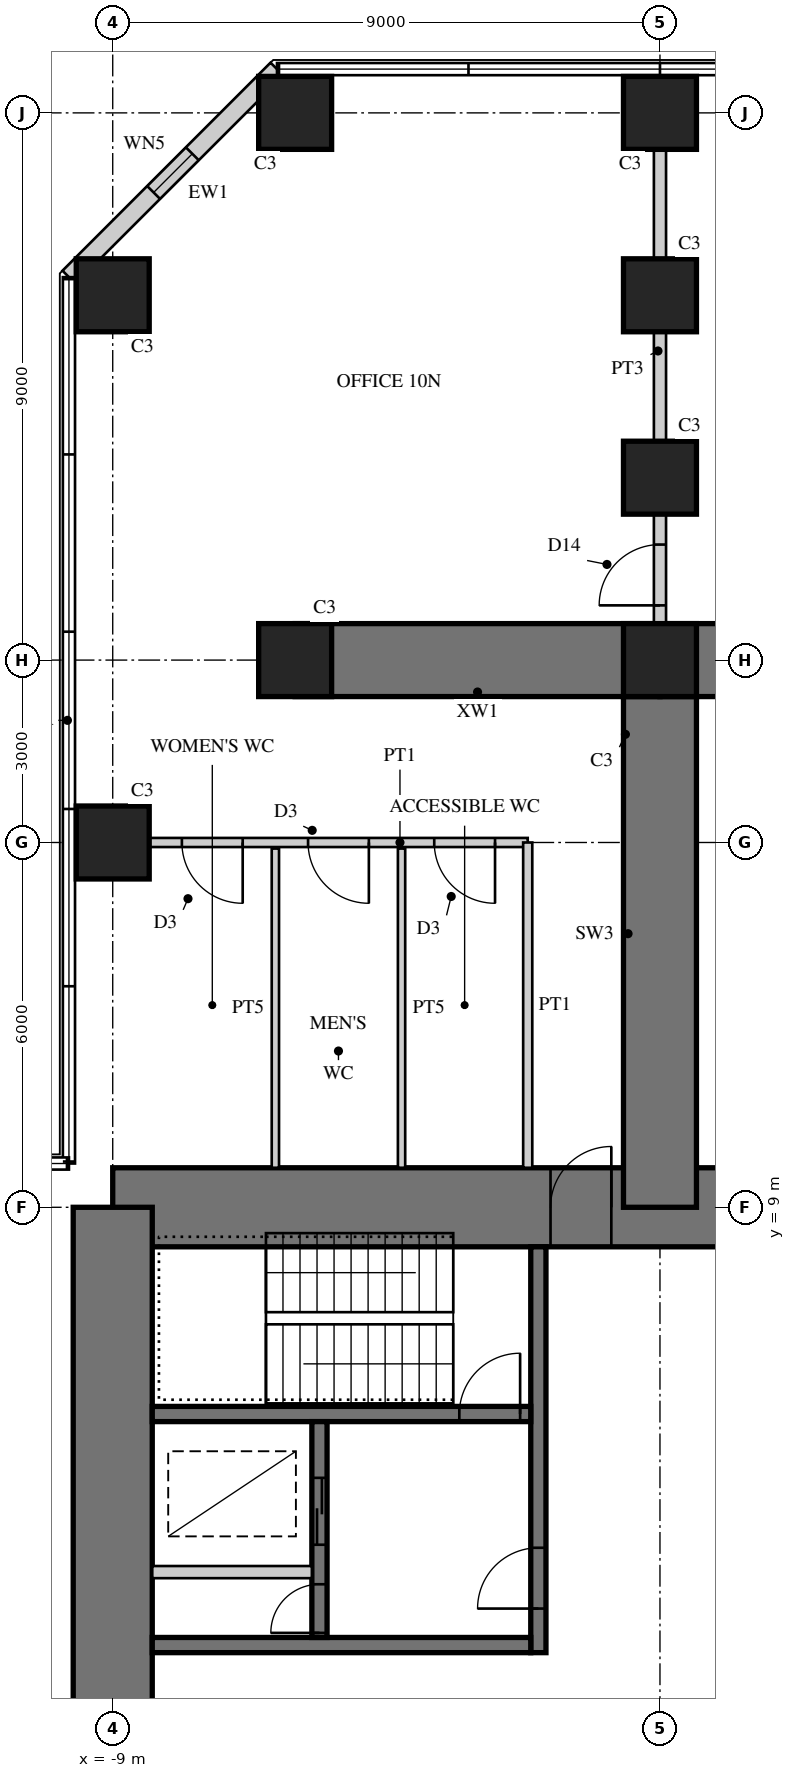
"""IFC4 building model, lengths in metres.
Left out: names, types, materials, properties, quantities, classifications, styles, units other than length and angle.
Written with IfcOpenShell. Run it as: python <this file> out.ifc"""

import sys

from ifc_helpers import new_model, si_unit, direction, frame, frame_2d, origin, origin_2d, place, context, subcontext, project, spatial, rectangle, hollow_rectangle, extrude, element, fill, save


model = new_model("IFC4")
c1 = context("Model", 3, precision=1e-05, world=origin(), true_north=direction((0.0, 1.0)))
c2 = subcontext(c1, "Body", "Model", "MODEL_VIEW")
j1 = project(units=[si_unit("LENGTHUNIT", "METRE"), si_unit("PLANEANGLEUNIT", "RADIAN")], contexts=[c1])
p1 = place(None, origin())
s1 = spatial("IfcSite", under=j1, at=p1, CompositionType="ELEMENT")
p2 = place(p1, origin())
s2 = spatial("IfcBuilding", under=s1, at=p2, CompositionType="ELEMENT")
p3 = place(p2, frame((0.0, 0.0, 43.5)))
s3 = spatial("IfcBuildingStorey", under=s2, at=p3, CompositionType="ELEMENT", Elevation=43.5)
p4 = place(p3, frame((9.0, 9.0, 0.0), z_axis=(0.0, 0.0, 1.0), x_axis=(-1.0, 0.0, 0.0)))
e1 = element("IfcWall", 1, at=p4, inside=s3, PredefinedType="SHEAR", context=c2, shape_type="SweptSolid", body=[
    extrude(rectangle(XDim=18.0, YDim=1.3, at=frame_2d((9.0, 0.0))), origin(), (0.0, 0.0, 1.0), 4.0),
])
p5 = place(p4, frame((9.8, 0.0, 0.0)))
e2 = element("IfcOpeningElement", 2, at=p5, cuts=e1, PredefinedType="OPENING", context=c2, shape_type="SweptSolid", body=[
    extrude(rectangle(XDim=1.0, YDim=2.4, at=frame_2d((0.5, 1.2))), frame((0.0, 0.66, 0.0), z_axis=(0.0, -1.0, 0.0), x_axis=(1.0, 0.0, 0.0)), (0.0, 0.0, 1.0), 1.32),
])
p6 = place(p3, frame((-9.0, 9.0, 0.0), z_axis=(0.0, 0.0, 1.0), x_axis=(0.0, -1.0, 0.0)))
e3 = element("IfcWall", 3, at=p6, inside=s3, PredefinedType="SHEAR", context=c2, shape_type="SweptSolid", body=[
    extrude(rectangle(XDim=18.0, YDim=1.3, at=frame_2d((9.0, 0.0))), origin(), (0.0, 0.0, 1.0), 4.0),
])
p7 = place(p6, frame((9.8, 0.0, 0.0)))
e4 = element("IfcOpeningElement", 4, at=p7, cuts=e3, PredefinedType="OPENING", context=c2, shape_type="SweptSolid", body=[
    extrude(rectangle(XDim=1.0, YDim=2.4, at=frame_2d((0.5, 1.2))), frame((0.0, 0.66, 0.0), z_axis=(0.0, -1.0, 0.0), x_axis=(1.0, 0.0, 0.0)), (0.0, 0.0, 1.0), 1.32),
])
p8 = place(p3, frame((-2.0, 1.675, 0.0), z_axis=(0.0, 0.0, 1.0), x_axis=(0.0, 1.0, 0.0)))
e5 = element("IfcWall", 5, at=p8, inside=s3, PredefinedType="SHEAR", context=c2, shape_type="SweptSolid", body=[
    extrude(rectangle(XDim=6.675, YDim=0.25, at=frame_2d((3.337, 0.0))), origin(), (0.0, 0.0, 1.0), 4.0),
])
p9 = place(p8, frame((0.725, 0.0, 0.0)))
e6 = element("IfcOpeningElement", 6, at=p9, cuts=e5, PredefinedType="OPENING", context=c2, shape_type="SweptSolid", body=[
    extrude(rectangle(XDim=1.0, YDim=2.1, at=frame_2d((0.5, 1.05))), frame((0.0, 0.135, 0.0), z_axis=(0.0, -1.0, 0.0), x_axis=(1.0, 0.0, 0.0)), (0.0, 0.0, 1.0), 0.27),
])
p10 = place(p3, frame((-2.125, 1.8, 0.0), z_axis=(0.0, 0.0, 1.0), x_axis=(-1.0, 0.0, 0.0)))
e7 = element("IfcWall", 7, at=p10, inside=s3, PredefinedType="SHEAR", context=c2, shape_type="SweptSolid", body=[
    extrude(rectangle(XDim=6.225, YDim=0.25, at=frame_2d((3.113, 0.0))), origin(), (0.0, 0.0, 1.0), 4.0),
])
p11 = place(p3, frame((-2.125, 5.6, 0.0), z_axis=(0.0, 0.0, 1.0), x_axis=(-1.0, 0.0, 0.0)))
e8 = element("IfcWall", 8, at=p11, inside=s3, PredefinedType="SHEAR", context=c2, shape_type="SweptSolid", body=[
    extrude(rectangle(XDim=6.225, YDim=0.25, at=frame_2d((3.113, 0.0))), origin(), (0.0, 0.0, 1.0), 4.0),
])
p12 = place(p11, frame((0.175, 0.0, 0.0)))
e9 = element("IfcOpeningElement", 9, at=p12, cuts=e8, PredefinedType="OPENING", context=c2, shape_type="SweptSolid", body=[
    extrude(rectangle(XDim=1.0, YDim=2.1, at=frame_2d((0.5, 1.05))), frame((0.0, 0.135, 0.0), z_axis=(0.0, -1.0, 0.0), x_axis=(1.0, 0.0, 0.0)), (0.0, 0.0, 1.0), 0.27),
])
p13 = place(p3, frame((-5.6, 1.925, 0.0), z_axis=(0.0, 0.0, 1.0), x_axis=(0.0, 1.0, 0.0)))
e10 = element("IfcWall", 10, at=p13, inside=s3, PredefinedType="SHEAR", context=c2, shape_type="SweptSolid", body=[
    extrude(rectangle(XDim=3.55, YDim=0.25, at=frame_2d((1.775, 0.0))), origin(), (0.0, 0.0, 1.0), 4.0),
])
p14 = place(p13, frame((1.525, 0.0, 0.0)))
e11 = element("IfcOpeningElement", 11, at=p14, cuts=e10, PredefinedType="OPENING", context=c2, shape_type="SweptSolid", body=[
    extrude(rectangle(XDim=1.1, YDim=2.2, at=frame_2d((0.55, 1.1))), frame((0.0, 0.135, 0.0), z_axis=(0.0, -1.0, 0.0), x_axis=(1.0, 0.0, 0.0)), (0.0, 0.0, 1.0), 0.27),
])
p15 = place(p13, frame((0.075, 0.0, 0.0)))
e12 = element("IfcOpeningElement", 12, at=p15, cuts=e10, PredefinedType="OPENING", context=c2, shape_type="SweptSolid", body=[
    extrude(rectangle(XDim=0.8, YDim=2.1, at=frame_2d((0.4, 1.05))), frame((0.0, 0.135, 0.0), z_axis=(0.0, -1.0, 0.0), x_axis=(1.0, 0.0, 0.0)), (0.0, 0.0, 1.0), 0.27),
])
p16 = place(p3, frame((-5.725, 3.0, 0.0), z_axis=(0.0, 0.0, 1.0), x_axis=(-1.0, 0.0, 0.0)))
e13 = element("IfcWall", 13, at=p16, inside=s3, PredefinedType="PARTITIONING", context=c2, shape_type="SweptSolid", body=[
    extrude(rectangle(XDim=2.625, YDim=0.2, at=frame_2d((1.312, 0.0))), origin(), (0.0, 0.0, 1.0), 4.0),
])
p17 = place(p3, frame((0.0, 9.0, 0.0), z_axis=(0.0, 0.0, 1.0), x_axis=(0.0, 1.0, 0.0)))
e14 = element("IfcWall", 14, at=p17, inside=s3, PredefinedType="SHEAR", context=c2, shape_type="SweptSolid", body=[
    extrude(rectangle(XDim=9.0, YDim=1.2, at=frame_2d((4.5, 0.0))), origin(), (0.0, 0.0, 1.0), 4.0),
])
for number, where, z_axis, x_axis in (
    (15, (0.0, 18.0, 0.0), (0.0, 0.0, 1.0), (-1.0, 0.0, 0.0)),
    (16, (0.0, 18.0, 0.0), (0.0, 0.0, 1.0), (1.0, 0.0, 0.0)),
):
    element("IfcWall", number, at=place(p3, frame(where, z_axis=z_axis, x_axis=x_axis)), inside=s3, PredefinedType="SHEAR", context=c2, shape_type="SweptSolid", body=[
        extrude(rectangle(XDim=6.0, YDim=1.2, at=frame_2d((3.0, 0.0))), origin(), (0.0, 0.0, 1.0), 4.0),
    ])
for number, where, z_axis, x_axis in (
    (17, (-9.0, 15.0, 0.0), (0.0, 0.0, 1.0), (1.0, 0.0, 0.0)),
    (18, (-9.0, 24.0, 0.0), (0.0, 0.0, 1.0), (1.0, 0.0, 0.0)),
    (19, (0.0, 27.0, 0.0), (0.0, 0.0, 1.0), (1.0, 0.0, 0.0)),
    (20, (-6.0, 27.0, 0.0), (0.0, 0.0, 1.0), (1.0, 0.0, 0.0)),
    (21, (0.0, 18.0, 0.0), (0.0, 0.0, 1.0), (1.0, 0.0, 0.0)),
    (22, (-6.0, 18.0, 0.0), (0.0, 0.0, 1.0), (1.0, 0.0, 0.0)),
    (23, (0.0, 21.0, 0.0), (0.0, 0.0, 1.0), (1.0, 0.0, 0.0)),
    (24, (0.0, 24.0, 0.0), (0.0, 0.0, 1.0), (1.0, 0.0, 0.0)),
):
    element("IfcColumn", number, at=place(p3, frame(where, z_axis=z_axis, x_axis=x_axis)), inside=s3, PredefinedType="COLUMN", context=c2, shape_type="SweptSolid", body=[
        extrude(rectangle(XDim=1.2, YDim=1.2, at=origin_2d()), origin(), (0.0, 0.0, 1.0), 4.0),
    ])
p18 = place(p3, frame((-6.298, 27.72, 0.0), z_axis=(0.0, 0.0, 1.0), x_axis=(-0.707106781187, -0.707106781187, 0.0)))
e25 = element("IfcWall", 25, at=p18, inside=s3, PredefinedType="SOLIDWALL", context=c2, shape_type="SweptSolid", body=[
    extrude(rectangle(XDim=4.839, YDim=0.3, at=frame_2d((2.419, 0.0))), origin(), (0.0, 0.0, 1.0), 3.8),
])
p19 = place(p18, frame((1.969, 0.0, 0.3)))
e26 = element("IfcOpeningElement", 26, at=p19, cuts=e25, PredefinedType="OPENING", context=c2, shape_type="SweptSolid", body=[
    extrude(rectangle(XDim=0.9, YDim=2.4, at=frame_2d((0.45, 1.2))), frame((0.0, 0.16, 0.0), z_axis=(0.0, -1.0, 0.0), x_axis=(1.0, 0.0, 0.0)), (0.0, 0.0, 1.0), 0.32),
])
p20 = place(p3, frame((-2.175, 15.0, 0.0), z_axis=(0.0, 0.0, 1.0), x_axis=(-1.0, 0.0, 0.0)))
e27 = element("IfcWall", 27, at=p20, inside=s3, PredefinedType="PARTITIONING", context=c2, shape_type="SweptSolid", body=[
    extrude(rectangle(XDim=6.225, YDim=0.15, at=frame_2d((3.112, 0.0))), origin(), (0.0, 0.0, 1.0), 2.95),
])
p21 = place(p20, frame((0.538, 0.0, 0.0)))
e28 = element("IfcOpeningElement", 28, at=p21, cuts=e27, PredefinedType="OPENING", context=c2, shape_type="SweptSolid", body=[
    extrude(rectangle(XDim=1.0, YDim=2.1, at=frame_2d((0.5, 1.05))), frame((0.0, 0.085, 0.0), z_axis=(0.0, -1.0, 0.0), x_axis=(1.0, 0.0, 0.0)), (0.0, 0.0, 1.0), 0.17),
])
p22 = place(p20, frame((2.613, 0.0, 0.0)))
e29 = element("IfcOpeningElement", 29, at=p22, cuts=e27, PredefinedType="OPENING", context=c2, shape_type="SweptSolid", body=[
    extrude(rectangle(XDim=1.0, YDim=2.1, at=frame_2d((0.5, 1.05))), frame((0.0, 0.085, 0.0), z_axis=(0.0, -1.0, 0.0), x_axis=(1.0, 0.0, 0.0)), (0.0, 0.0, 1.0), 0.17),
])
p23 = place(p20, frame((4.688, 0.0, 0.0)))
e30 = element("IfcOpeningElement", 30, at=p23, cuts=e27, PredefinedType="OPENING", context=c2, shape_type="SweptSolid", body=[
    extrude(rectangle(XDim=1.0, YDim=2.1, at=frame_2d((0.5, 1.05))), frame((0.0, 0.085, 0.0), z_axis=(0.0, -1.0, 0.0), x_axis=(1.0, 0.0, 0.0)), (0.0, 0.0, 1.0), 0.17),
])
p24 = place(p3, frame((-2.175, 9.65, 0.0), z_axis=(0.0, 0.0, 1.0), x_axis=(0.0, 1.0, 0.0)))
e31 = element("IfcWall", 31, at=p24, inside=s3, PredefinedType="PARTITIONING", context=c2, shape_type="SweptSolid", body=[
    extrude(rectangle(XDim=5.35, YDim=0.15, at=frame_2d((2.675, 0.0))), origin(), (0.0, 0.0, 1.0), 3.8),
])
for number, where, z_axis, x_axis in (
    (32, (-4.25, 9.65, 0.0), (0.0, 0.0, 1.0), (0.0, 1.0, 0.0)),
    (33, (-6.325, 9.65, 0.0), (0.0, 0.0, 1.0), (0.0, 1.0, 0.0)),
):
    element("IfcWall", number, at=place(p3, frame(where, z_axis=z_axis, x_axis=x_axis)), inside=s3, PredefinedType="PLUMBINGWALL", context=c2, shape_type="SweptSolid", body=[
        extrude(rectangle(XDim=5.25, YDim=0.12, at=frame_2d((2.625, 0.0))), origin(), (0.0, 0.0, 1.0), 3.8),
    ])
p25 = place(p3, frame((0.0, 18.0, 0.0), z_axis=(0.0, 0.0, 1.0), x_axis=(0.0, 1.0, 0.0)))
e34 = element("IfcWall", 34, at=p25, inside=s3, PredefinedType="SOLIDWALL", context=c2, shape_type="SweptSolid", body=[
    extrude(rectangle(XDim=3.0, YDim=0.2, at=frame_2d((1.5, 0.0))), origin(), (0.0, 0.0, 1.0), 3.8),
])
p26 = place(p25, frame((0.9, 0.0, 0.0)))
e35 = element("IfcOpeningElement", 35, at=p26, cuts=e34, PredefinedType="OPENING", context=c2, shape_type="SweptSolid", body=[
    extrude(rectangle(XDim=1.0, YDim=2.2, at=frame_2d((0.5, 1.1))), frame((0.0, 0.11, 0.0), z_axis=(0.0, -1.0, 0.0), x_axis=(1.0, 0.0, 0.0)), (0.0, 0.0, 1.0), 0.22),
])
p27 = place(p3, frame((0.0, 21.0, 0.0), z_axis=(0.0, 0.0, 1.0), x_axis=(0.0, 1.0, 0.0)))
e36 = element("IfcWall", 36, at=p27, inside=s3, PredefinedType="SOLIDWALL", context=c2, shape_type="SweptSolid", body=[
    extrude(rectangle(XDim=6.0, YDim=0.2, at=frame_2d((3.0, 0.0))), origin(), (0.0, 0.0, 1.0), 2.9),
])
p28 = place(p19, origin())
e37 = element("IfcWindow", 37, at=p28, inside=s3, PartitioningType="SINGLE_PANEL", PredefinedType="WINDOW", context=c2, shape_type="SweptSolid", body=[
    extrude(hollow_rectangle(XDim=0.9, YDim=2.4, WallThickness=0.06, at=frame_2d((0.45, 1.2))), frame((0.0, 0.03, 0.0), z_axis=(0.0, -1.0, 0.0), x_axis=(1.0, 0.0, 0.0)), (0.0, 0.0, 1.0), 0.06),
    extrude(rectangle(XDim=0.779, YDim=2.279, at=frame_2d((0.45, 1.2))), frame((0.0, 0.03, 0.0), z_axis=(0.0, -1.0, 0.0), x_axis=(1.0, 0.0, 0.0)), (0.0, 0.0, 1.0), 0.06),
])
fill(e26, e37)
p29 = place(p21, origin())
e38 = element("IfcDoor", 38, at=p29, inside=s3, OperationType="SINGLE_SWING_LEFT", PredefinedType="DOOR", context=c2, shape_type="SweptSolid", body=[
    extrude(rectangle(XDim=1.0, YDim=2.1, at=frame_2d((0.5, 1.05))), frame((0.0, 0.025, 0.0), z_axis=(0.0, -1.0, 0.0), x_axis=(1.0, 0.0, 0.0)), (0.0, 0.0, 1.0), 0.05),
])
fill(e28, e38)
p30 = place(p22, origin())
e39 = element("IfcDoor", 39, at=p30, inside=s3, OperationType="SINGLE_SWING_LEFT", PredefinedType="DOOR", context=c2, shape_type="SweptSolid", body=[
    extrude(rectangle(XDim=1.0, YDim=2.1, at=frame_2d((0.5, 1.05))), frame((0.0, 0.025, 0.0), z_axis=(0.0, -1.0, 0.0), x_axis=(1.0, 0.0, 0.0)), (0.0, 0.0, 1.0), 0.05),
])
fill(e29, e39)
p31 = place(p23, origin())
e40 = element("IfcDoor", 40, at=p31, inside=s3, OperationType="SINGLE_SWING_LEFT", PredefinedType="DOOR", context=c2, shape_type="SweptSolid", body=[
    extrude(rectangle(XDim=1.0, YDim=2.1, at=frame_2d((0.5, 1.05))), frame((0.0, 0.025, 0.0), z_axis=(0.0, -1.0, 0.0), x_axis=(1.0, 0.0, 0.0)), (0.0, 0.0, 1.0), 0.05),
])
fill(e30, e40)
p32 = place(p26, origin())
e41 = element("IfcDoor", 41, at=p32, inside=s3, OperationType="SINGLE_SWING_LEFT", PredefinedType="DOOR", context=c2, shape_type="SweptSolid", body=[
    extrude(rectangle(XDim=1.0, YDim=2.2, at=frame_2d((0.5, 1.1))), frame((0.0, 0.025, 0.0), z_axis=(0.0, -1.0, 0.0), x_axis=(1.0, 0.0, 0.0)), (0.0, 0.0, 1.0), 0.05),
])
fill(e35, e41)
p33 = place(p5, frame((1.0, 0.0, 0.0), z_axis=(0.0, 0.0, 1.0), x_axis=(-1.0, 0.0, 0.0)))
e42 = element("IfcDoor", 42, at=p33, inside=s3, OperationType="SINGLE_SWING_RIGHT", PredefinedType="DOOR", context=c2, shape_type="SweptSolid", body=[
    extrude(rectangle(XDim=1.0, YDim=2.4, at=frame_2d((0.5, 1.2))), frame((0.0, -0.005, 0.0), z_axis=(0.0, -1.0, 0.0), x_axis=(1.0, 0.0, 0.0)), (0.0, 0.0, 1.0), 0.05),
])
fill(e2, e42)
p34 = place(p9, origin())
e43 = element("IfcDoor", 43, at=p34, inside=s3, OperationType="SINGLE_SWING_LEFT", PredefinedType="DOOR", context=c2, shape_type="SweptSolid", body=[
    extrude(rectangle(XDim=1.0, YDim=2.1, at=frame_2d((0.5, 1.05))), frame((0.0, 0.025, 0.0), z_axis=(0.0, -1.0, 0.0), x_axis=(1.0, 0.0, 0.0)), (0.0, 0.0, 1.0), 0.05),
])
fill(e6, e43)
p35 = place(p12, frame((1.0, 0.0, 0.0), z_axis=(0.0, 0.0, 1.0), x_axis=(-1.0, 0.0, 0.0)))
e44 = element("IfcDoor", 44, at=p35, inside=s3, OperationType="SINGLE_SWING_RIGHT", PredefinedType="DOOR", context=c2, shape_type="SweptSolid", body=[
    extrude(rectangle(XDim=1.0, YDim=2.1, at=frame_2d((0.5, 1.05))), frame((0.0, 0.025, 0.0), z_axis=(0.0, -1.0, 0.0), x_axis=(1.0, 0.0, 0.0)), (0.0, 0.0, 1.0), 0.05),
])
fill(e9, e44)
p36 = place(p14, origin())
e45 = element("IfcDoor", 45, at=p36, inside=s3, OperationType="DOUBLE_DOOR_SLIDING", PredefinedType="DOOR", context=c2, shape_type="SweptSolid", body=[
    extrude(rectangle(XDim=1.1, YDim=2.2, at=frame_2d((0.55, 1.1))), frame((0.0, 0.025, 0.0), z_axis=(0.0, -1.0, 0.0), x_axis=(1.0, 0.0, 0.0)), (0.0, 0.0, 1.0), 0.05),
])
fill(e11, e45)
p37 = place(p15, origin())
e46 = element("IfcDoor", 46, at=p37, inside=s3, OperationType="SINGLE_SWING_LEFT", PredefinedType="DOOR", context=c2, shape_type="SweptSolid", body=[
    extrude(rectangle(XDim=0.8, YDim=2.1, at=frame_2d((0.4, 1.05))), frame((0.0, 0.025, 0.0), z_axis=(0.0, -1.0, 0.0), x_axis=(1.0, 0.0, 0.0)), (0.0, 0.0, 1.0), 0.05),
])
fill(e12, e46)
save(model, sys.argv[1])
